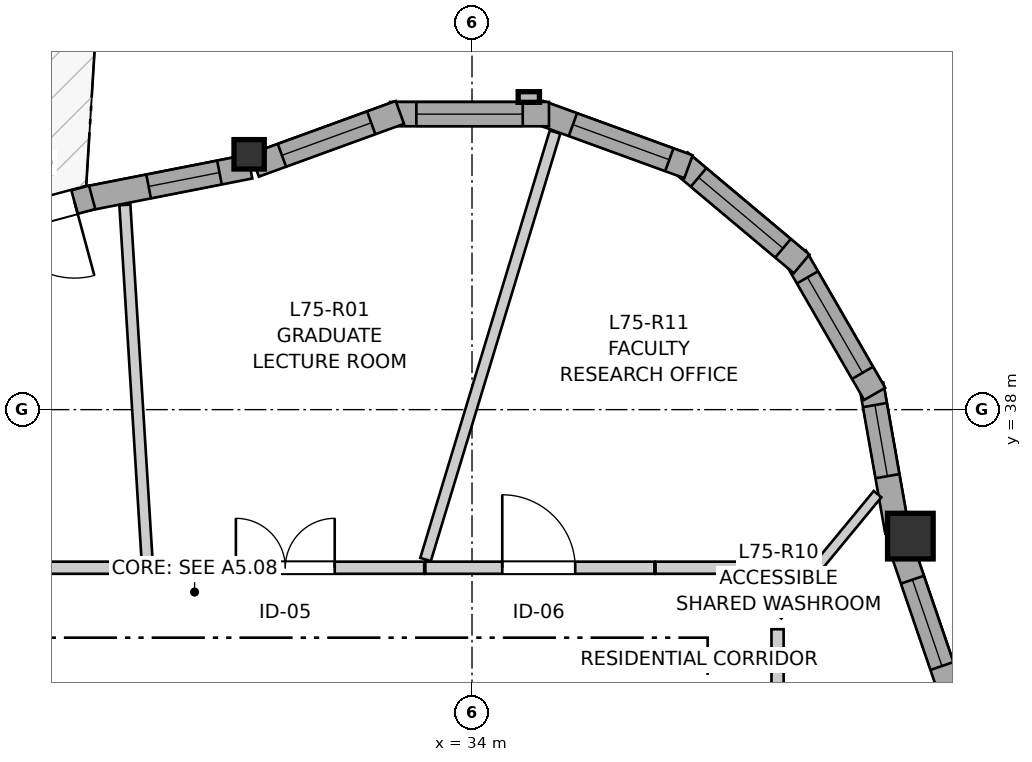
"""IFC4 building model, lengths in metres.
Left out: names, types, materials, properties, quantities, classifications, styles, units other than length and angle.
Written with IfcOpenShell. Run it as: python <this file> out.ifc"""

import sys

from ifc_helpers import new_model, si_unit, direction, frame, frame_2d, origin, origin_2d, place, context, subcontext, project, spatial, rectangle, i_section, extrude, source, transform, mapped, element, fill, save


model = new_model("IFC4")
c1 = context("Model", 3, precision=1e-05, world=origin(), true_north=direction((0.0, 1.0)))
c2 = subcontext(c1, "Body", "Model", "MODEL_VIEW")
j1 = project(units=[si_unit("LENGTHUNIT", "METRE"), si_unit("PLANEANGLEUNIT", "RADIAN")], contexts=[c1])
p1 = place(None, origin())
s1 = spatial("IfcSite", under=j1, at=p1, CompositionType="ELEMENT")
p2 = place(p1, origin())
s2 = spatial("IfcBuilding", under=s1, at=p2, CompositionType="ELEMENT")
p3 = place(p2, frame((0.0, 0.0, 250.0)))
s3 = spatial("IfcBuildingStorey", under=s2, at=p3, CompositionType="ELEMENT", Elevation=250.0)
m1 = source(origin(), c2, "Body", "SweptSolid", [
    extrude(rectangle(XDim=0.6, YDim=0.6, at=origin_2d()), origin(), (0.0, 0.0, 1.0), 2.95),
])
p4 = place(p3, frame((39.768, 36.336, 0.0), z_axis=(0.0, 0.0, 1.0), x_axis=(1.0, 0.0, 0.0)))
e1 = element("IfcColumn", 1, at=p4, inside=s3, PredefinedType="COLUMN", context=c2, shape_type="MappedRepresentation", body=[
    mapped(m1, transform((0.0, 0.0, 0.0), x_axis=(1.0, 0.0, 0.0), y_axis=(0.0, 1.0, 0.0), z_axis=(0.0, 0.0, 1.0), scale=1.0)),
])
m2 = source(origin(), c2, "Body", "SweptSolid", [
    extrude(i_section(OverallWidth=0.398, OverallDepth=0.387, WebThickness=0.019, FlangeThickness=0.03, FilletRadius=0.015, at=origin_2d()), origin(), (0.0, 0.0, 1.0), 2.95),
])
p5 = place(p3, frame((31.067, 41.359, 0.0), z_axis=(0.0, 0.0, 1.0), x_axis=(1.0, 0.0, 0.0)))
e2 = element("IfcColumn", 2, at=p5, inside=s3, PredefinedType="PILASTER", context=c2, shape_type="MappedRepresentation", body=[
    mapped(m2, transform((0.0, 0.0, 0.0), x_axis=(1.0, 0.0, 0.0), y_axis=(0.0, 1.0, 0.0), z_axis=(0.0, 0.0, 1.0), scale=1.0)),
])
p6 = place(p3, frame((40.335, 34.181, 0.0), z_axis=(0.0, 0.0, 1.0), x_axis=(-0.323601383087, 0.946193502865, 0.0)))
e3 = element("IfcWall", 3, at=p6, inside=s3, PredefinedType="SOLIDWALL", context=c2, shape_type="SweptSolid", body=[
    extrude(rectangle(XDim=2.133, YDim=0.32, at=frame_2d((1.066, 0.0))), origin(), (0.0, 0.0, 1.0), 2.57),
])
p7 = place(p6, frame((0.471, 0.0, 0.82)))
e4 = element("IfcOpeningElement", 4, at=p7, cuts=e3, PredefinedType="OPENING", context=c2, shape_type="SweptSolid", body=[
    extrude(rectangle(XDim=1.2, YDim=1.45, at=frame_2d((0.6, 0.725))), frame((0.0, 0.17, 0.0), z_axis=(0.0, -1.0, 0.0), x_axis=(1.0, 0.0, 0.0)), (0.0, 0.0, 1.0), 0.34),
])
p8 = place(p3, frame((39.594, 36.397, 0.0), z_axis=(0.0, 0.0, 1.0), x_axis=(-0.173671780312, 0.984803590937, 0.0)))
e5 = element("IfcWall", 5, at=p8, inside=s3, PredefinedType="SOLIDWALL", context=c2, shape_type="SweptSolid", body=[
    extrude(rectangle(XDim=1.962, YDim=0.32, at=frame_2d((0.981, 0.0))), origin(), (0.0, 0.0, 1.0), 2.57),
])
p9 = place(p8, frame((0.739, 0.0, 0.82)))
e6 = element("IfcOpeningElement", 6, at=p9, cuts=e5, PredefinedType="OPENING", context=c2, shape_type="SweptSolid", body=[
    extrude(rectangle(XDim=0.95, YDim=1.35, at=frame_2d((0.475, 0.675))), frame((0.0, 0.17, 0.0), z_axis=(0.0, -1.0, 0.0), x_axis=(1.0, 0.0, 0.0)), (0.0, 0.0, 1.0), 0.34),
])
p10 = place(p3, frame((39.298, 38.207, 0.0), z_axis=(0.0, 0.0, 1.0), x_axis=(-0.499995423472, 0.866028046028, 0.0)))
e7 = element("IfcWall", 7, at=p10, inside=s3, PredefinedType="SOLIDWALL", context=c2, shape_type="SweptSolid", body=[
    extrude(rectangle(XDim=2.09, YDim=0.32, at=frame_2d((1.045, 0.0))), origin(), (0.0, 0.0, 1.0), 2.57),
])
p11 = place(p10, frame((0.32, 0.0, 0.82)))
e8 = element("IfcOpeningElement", 8, at=p11, cuts=e7, PredefinedType="OPENING", context=c2, shape_type="SweptSolid", body=[
    extrude(rectangle(XDim=1.45, YDim=1.25, at=frame_2d((0.725, 0.625))), frame((0.0, 0.17, 0.0), z_axis=(0.0, -1.0, 0.0), x_axis=(1.0, 0.0, 0.0)), (0.0, 0.0, 1.0), 0.34),
])
p12 = place(p3, frame((38.337, 39.917, 0.0), z_axis=(0.0, 0.0, 1.0), x_axis=(-0.766024572719, 0.642811289563, 0.0)))
e9 = element("IfcWall", 9, at=p12, inside=s3, PredefinedType="SOLIDWALL", context=c2, shape_type="SweptSolid", body=[
    extrude(rectangle(XDim=2.09, YDim=0.32, at=frame_2d((1.045, 0.0))), origin(), (0.0, 0.0, 1.0), 2.57),
])
p13 = place(p12, frame((0.32, 0.0, 0.82)))
e10 = element("IfcOpeningElement", 10, at=p13, cuts=e9, PredefinedType="OPENING", context=c2, shape_type="SweptSolid", body=[
    extrude(rectangle(XDim=1.45, YDim=1.25, at=frame_2d((0.725, 0.625))), frame((0.0, 0.17, 0.0), z_axis=(0.0, -1.0, 0.0), x_axis=(1.0, 0.0, 0.0)), (0.0, 0.0, 1.0), 0.34),
])
p14 = place(p3, frame((36.848, 41.196, 0.0), z_axis=(0.0, 0.0, 1.0), x_axis=(-0.93973543134, 0.341902499383, 0.0)))
e11 = element("IfcWall", 11, at=p14, inside=s3, PredefinedType="SOLIDWALL", context=c2, shape_type="SweptSolid", body=[
    extrude(rectangle(XDim=2.09, YDim=0.32, at=frame_2d((1.045, 0.0))), origin(), (0.0, 0.0, 1.0), 2.57),
])
p15 = place(p14, frame((0.269, 0.0, 0.82)))
e12 = element("IfcOpeningElement", 12, at=p15, cuts=e11, PredefinedType="OPENING", context=c2, shape_type="SweptSolid", body=[
    extrude(rectangle(XDim=1.35, YDim=1.45, at=frame_2d((0.675, 0.725))), frame((0.0, 0.17, 0.0), z_axis=(0.0, -1.0, 0.0), x_axis=(1.0, 0.0, 0.0)), (0.0, 0.0, 1.0), 0.34),
])
p16 = place(p3, frame((35.013, 41.888, 0.0), z_axis=(0.0, 0.0, 1.0), x_axis=(-1.0, 0.0, 0.0)))
e13 = element("IfcWall", 13, at=p16, inside=s3, PredefinedType="SOLIDWALL", context=c2, shape_type="SweptSolid", body=[
    extrude(rectangle(XDim=2.09, YDim=0.32, at=frame_2d((1.045, 0.0))), origin(), (0.0, 0.0, 1.0), 2.57),
])
p17 = place(p16, frame((0.345, 0.0, 0.82)))
e14 = element("IfcOpeningElement", 14, at=p17, cuts=e13, PredefinedType="OPENING", context=c2, shape_type="SweptSolid", body=[
    extrude(rectangle(XDim=1.4, YDim=1.35, at=frame_2d((0.7, 0.675))), frame((0.0, 0.17, 0.0), z_axis=(0.0, -1.0, 0.0), x_axis=(1.0, 0.0, 0.0)), (0.0, 0.0, 1.0), 0.34),
])
p18 = place(p3, frame((33.051, 41.91, 0.0), z_axis=(0.0, 0.0, 1.0), x_axis=(-0.939730268502, -0.341916689358, 0.0)))
e15 = element("IfcWall", 15, at=p18, inside=s3, PredefinedType="SOLIDWALL", context=c2, shape_type="SweptSolid", body=[
    extrude(rectangle(XDim=2.032, YDim=0.32, at=frame_2d((1.016, 0.0))), origin(), (0.0, 0.0, 1.0), 2.57),
])
p19 = place(p18, frame((0.401, 0.0, 0.82)))
e16 = element("IfcOpeningElement", 16, at=p19, cuts=e15, PredefinedType="OPENING", context=c2, shape_type="SweptSolid", body=[
    extrude(rectangle(XDim=1.25, YDim=1.35, at=frame_2d((0.625, 0.675))), frame((0.0, 0.17, 0.0), z_axis=(0.0, -1.0, 0.0), x_axis=(1.0, 0.0, 0.0)), (0.0, 0.0, 1.0), 0.34),
])
p20 = place(p3, frame((31.079, 41.198, 0.0), z_axis=(0.0, 0.0, 1.0), x_axis=(-0.981223354781, -0.192874902544, 0.0)))
e17 = element("IfcWall", 17, at=p20, inside=s3, PredefinedType="SOLIDWALL", context=c2, shape_type="SweptSolid", body=[
    extrude(rectangle(XDim=2.202, YDim=0.32, at=frame_2d((1.101, 0.0))), origin(), (0.0, 0.0, 1.0), 2.57),
])
p21 = place(p20, frame((0.409, 0.0, 0.82)))
e18 = element("IfcOpeningElement", 18, at=p21, cuts=e17, PredefinedType="OPENING", context=c2, shape_type="SweptSolid", body=[
    extrude(rectangle(XDim=0.95, YDim=1.35, at=frame_2d((0.475, 0.675))), frame((0.0, 0.17, 0.0), z_axis=(0.0, -1.0, 0.0), x_axis=(1.0, 0.0, 0.0)), (0.0, 0.0, 1.0), 0.34),
])
p22 = place(p3, frame((29.002, 40.793, 0.0), z_axis=(0.0, 0.0, 1.0), x_axis=(-0.965467637734, -0.260523013357, 0.0)))
e19 = element("IfcWall", 19, at=p22, inside=s3, PredefinedType="SOLIDWALL", context=c2, shape_type="SweptSolid", body=[
    extrude(rectangle(XDim=2.087, YDim=0.32, at=frame_2d((1.043, 0.0))), origin(), (0.0, 0.0, 1.0), 2.57),
])
p23 = place(p22, frame((0.24, 0.0, 0.0)))
e20 = element("IfcOpeningElement", 20, at=p23, cuts=e19, PredefinedType="OPENING", context=c2, shape_type="SweptSolid", body=[
    extrude(rectangle(XDim=1.0, YDim=2.1, at=frame_2d((0.5, 1.05))), frame((0.0, 0.17, 0.0), z_axis=(0.0, -1.0, 0.0), x_axis=(1.0, 0.0, 0.0)), (0.0, 0.0, 1.0), 0.34),
])
p24 = place(p3, frame((24.3, 35.92, 0.0), z_axis=(0.0, 0.0, 1.0), x_axis=(1.0, 0.0, 0.0)))
e21 = element("IfcWall", 21, at=p24, inside=s3, PredefinedType="PARTITIONING", context=c2, shape_type="SweptSolid", body=[
    extrude(rectangle(XDim=5.446, YDim=0.16, at=frame_2d((2.723, 0.0))), origin(), (0.0, 0.0, 1.0), 2.95),
])
p25 = place(p24, frame((2.236, 0.0, 0.0)))
e22 = element("IfcOpeningElement", 22, at=p25, cuts=e21, PredefinedType="OPENING", context=c2, shape_type="SweptSolid", body=[
    extrude(rectangle(XDim=0.96, YDim=2.1, at=frame_2d((0.48, 1.05))), frame((0.0, 0.09, 0.0), z_axis=(0.0, -1.0, 0.0), x_axis=(1.0, 0.0, 0.0)), (0.0, 0.0, 1.0), 0.18),
])
p26 = place(p3, frame((29.761, 35.92, 0.0), z_axis=(0.0, 0.0, 1.0), x_axis=(1.0, 0.0, 0.0)))
e23 = element("IfcWall", 23, at=p26, inside=s3, PredefinedType="PARTITIONING", context=c2, shape_type="SweptSolid", body=[
    extrude(rectangle(XDim=3.61, YDim=0.16, at=frame_2d((1.805, 0.0))), origin(), (0.0, 0.0, 1.0), 2.95),
])
p27 = place(p26, frame((1.133, 0.0, 0.0)))
e24 = element("IfcOpeningElement", 24, at=p27, cuts=e23, PredefinedType="OPENING", context=c2, shape_type="SweptSolid", body=[
    extrude(rectangle(XDim=1.3, YDim=2.1, at=frame_2d((0.65, 1.05))), frame((0.0, 0.09, 0.0), z_axis=(0.0, -1.0, 0.0), x_axis=(1.0, 0.0, 0.0)), (0.0, 0.0, 1.0), 0.18),
])
p28 = place(p3, frame((33.386, 35.92, 0.0), z_axis=(0.0, 0.0, 1.0), x_axis=(1.0, 0.0, 0.0)))
e25 = element("IfcWall", 25, at=p28, inside=s3, PredefinedType="PARTITIONING", context=c2, shape_type="SweptSolid", body=[
    extrude(rectangle(XDim=3.014, YDim=0.16, at=frame_2d((1.507, 0.0))), origin(), (0.0, 0.0, 1.0), 2.588),
])
p29 = place(p28, frame((1.012, 0.0, 0.0)))
e26 = element("IfcOpeningElement", 26, at=p29, cuts=e25, PredefinedType="OPENING", context=c2, shape_type="SweptSolid", body=[
    extrude(rectangle(XDim=0.96, YDim=2.1, at=frame_2d((0.48, 1.05))), frame((0.0, 0.09, 0.0), z_axis=(0.0, -1.0, 0.0), x_axis=(1.0, 0.0, 0.0)), (0.0, 0.0, 1.0), 0.18),
])
p30 = place(p3, frame((33.389, 36.029, 0.0), z_axis=(0.0, 0.0, 1.0), x_axis=(0.289965875663, 0.957036985153, 0.0)))
e27 = element("IfcWall", 27, at=p30, inside=s3, PredefinedType="PARTITIONING", context=c2, shape_type="SweptSolid", body=[
    extrude(rectangle(XDim=5.875, YDim=0.145, at=frame_2d((2.938, 0.0))), origin(), (0.0, 0.0, 1.0), 2.95),
])
p31 = place(p3, frame((29.433, 40.694, 0.0), z_axis=(0.0, 0.0, 1.0), x_axis=(0.062358842424, -0.998053793526, 0.0)))
e28 = element("IfcWall", 28, at=p31, inside=s3, PredefinedType="PARTITIONING", context=c2, shape_type="SweptSolid", body=[
    extrude(rectangle(XDim=4.69, YDim=0.145, at=frame_2d((2.345, 0.0))), origin(), (0.0, 0.0, 1.0), 2.95),
])
p32 = place(p3, frame((38.02, 35.294, 0.0), z_axis=(0.0, 0.0, 1.0), x_axis=(0.636518208935, 0.771261673943, 0.0)))
e29 = element("IfcWall", 29, at=p32, inside=s3, PredefinedType="PARTITIONING", context=c2, shape_type="SweptSolid", body=[
    extrude(rectangle(XDim=2.067, YDim=0.13, at=frame_2d((1.034, 0.0))), origin(), (0.0, 0.0, 1.0), 2.95),
])
p33 = place(p3, frame((36.415, 35.92, 0.0), z_axis=(0.0, 0.0, 1.0), x_axis=(1.0, 0.0, 0.0)))
e30 = element("IfcWall", 30, at=p33, inside=s3, PredefinedType="PARTITIONING", context=c2, shape_type="SweptSolid", body=[
    extrude(rectangle(XDim=1.605, YDim=0.16, at=frame_2d((0.802, 0.0))), origin(), (0.0, 0.0, 1.0), 2.588),
])
p34 = place(p3, frame((38.02, 34.315, 0.0), z_axis=(0.0, 0.0, 1.0), x_axis=(0.0, 1.0, 0.0)))
e31 = element("IfcWall", 31, at=p34, inside=s3, PredefinedType="PARTITIONING", context=c2, shape_type="SweptSolid", body=[
    extrude(rectangle(XDim=0.796, YDim=0.16, at=frame_2d((0.398, 0.0))), origin(), (0.0, 0.0, 1.0), 2.95),
])
p35 = place(p3, frame((38.02, 35.423, 0.0), z_axis=(0.0, 0.0, 1.0), x_axis=(0.0, 1.0, 0.0)))
e32 = element("IfcWall", 32, at=p35, inside=s3, PredefinedType="PARTITIONING", context=c2, shape_type="SweptSolid", body=[
    extrude(rectangle(XDim=0.497, YDim=0.16, at=frame_2d((0.249, 0.0))), origin(), (0.0, 0.0, 1.0), 2.95),
])
m3 = source(origin(), c2, "Body", "SweptSolid", [
    extrude(rectangle(XDim=1.2, YDim=1.45, at=frame_2d((0.6, 0.725))), frame((0.0, 0.03, 0.0), z_axis=(0.0, -1.0, 0.0), x_axis=(1.0, 0.0, 0.0)), (0.0, 0.0, 1.0), 0.06),
])
p36 = place(p7, origin())
e33 = element("IfcWindow", 33, at=p36, inside=s3, PartitioningType="SINGLE_PANEL", PredefinedType="WINDOW", context=c2, shape_type="MappedRepresentation", body=[
    mapped(m3, transform((0.0, 0.0, 0.0), x_axis=(1.0, 0.0, 0.0), y_axis=(0.0, 1.0, 0.0), z_axis=(0.0, 0.0, 1.0), scale=1.0)),
])
fill(e4, e33)
m4 = source(origin(), c2, "Body", "SweptSolid", [
    extrude(rectangle(XDim=0.95, YDim=1.35, at=frame_2d((0.475, 0.675))), frame((0.0, 0.03, 0.0), z_axis=(0.0, -1.0, 0.0), x_axis=(1.0, 0.0, 0.0)), (0.0, 0.0, 1.0), 0.06),
])
p37 = place(p9, origin())
e34 = element("IfcWindow", 34, at=p37, inside=s3, PartitioningType="SINGLE_PANEL", PredefinedType="WINDOW", context=c2, shape_type="MappedRepresentation", body=[
    mapped(m4, transform((0.0, 0.0, 0.0), x_axis=(1.0, 0.0, 0.0), y_axis=(0.0, 1.0, 0.0), z_axis=(0.0, 0.0, 1.0), scale=1.0)),
])
fill(e6, e34)
m5 = source(origin(), c2, "Body", "SweptSolid", [
    extrude(rectangle(XDim=1.45, YDim=1.25, at=frame_2d((0.725, 0.625))), frame((0.0, 0.03, 0.0), z_axis=(0.0, -1.0, 0.0), x_axis=(1.0, 0.0, 0.0)), (0.0, 0.0, 1.0), 0.06),
])
p38 = place(p11, origin())
e35 = element("IfcWindow", 35, at=p38, inside=s3, PartitioningType="SINGLE_PANEL", PredefinedType="WINDOW", context=c2, shape_type="MappedRepresentation", body=[
    mapped(m5, transform((0.0, 0.0, 0.0), x_axis=(1.0, 0.0, 0.0), y_axis=(0.0, 1.0, 0.0), z_axis=(0.0, 0.0, 1.0), scale=1.0)),
])
fill(e8, e35)
p39 = place(p13, origin())
e36 = element("IfcWindow", 36, at=p39, inside=s3, PartitioningType="SINGLE_PANEL", PredefinedType="WINDOW", context=c2, shape_type="MappedRepresentation", body=[
    mapped(m5, transform((0.0, 0.0, 0.0), x_axis=(1.0, 0.0, 0.0), y_axis=(0.0, 1.0, 0.0), z_axis=(0.0, 0.0, 1.0), scale=1.0)),
])
fill(e10, e36)
m6 = source(origin(), c2, "Body", "SweptSolid", [
    extrude(rectangle(XDim=1.35, YDim=1.45, at=frame_2d((0.675, 0.725))), frame((0.0, 0.03, 0.0), z_axis=(0.0, -1.0, 0.0), x_axis=(1.0, 0.0, 0.0)), (0.0, 0.0, 1.0), 0.06),
])
p40 = place(p15, origin())
e37 = element("IfcWindow", 37, at=p40, inside=s3, PartitioningType="SINGLE_PANEL", PredefinedType="WINDOW", context=c2, shape_type="MappedRepresentation", body=[
    mapped(m6, transform((0.0, 0.0, 0.0), x_axis=(1.0, 0.0, 0.0), y_axis=(0.0, 1.0, 0.0), z_axis=(0.0, 0.0, 1.0), scale=1.0)),
])
fill(e12, e37)
m7 = source(origin(), c2, "Body", "SweptSolid", [
    extrude(rectangle(XDim=1.4, YDim=1.35, at=frame_2d((0.7, 0.675))), frame((0.0, 0.03, 0.0), z_axis=(0.0, -1.0, 0.0), x_axis=(1.0, 0.0, 0.0)), (0.0, 0.0, 1.0), 0.06),
])
p41 = place(p17, origin())
e38 = element("IfcWindow", 38, at=p41, inside=s3, PartitioningType="SINGLE_PANEL", PredefinedType="WINDOW", context=c2, shape_type="MappedRepresentation", body=[
    mapped(m7, transform((0.0, 0.0, 0.0), x_axis=(1.0, 0.0, 0.0), y_axis=(0.0, 1.0, 0.0), z_axis=(0.0, 0.0, 1.0), scale=1.0)),
])
fill(e14, e38)
m8 = source(origin(), c2, "Body", "SweptSolid", [
    extrude(rectangle(XDim=1.25, YDim=1.35, at=frame_2d((0.625, 0.675))), frame((0.0, 0.03, 0.0), z_axis=(0.0, -1.0, 0.0), x_axis=(1.0, 0.0, 0.0)), (0.0, 0.0, 1.0), 0.06),
])
p42 = place(p19, origin())
e39 = element("IfcWindow", 39, at=p42, inside=s3, PartitioningType="SINGLE_PANEL", PredefinedType="WINDOW", context=c2, shape_type="MappedRepresentation", body=[
    mapped(m8, transform((0.0, 0.0, 0.0), x_axis=(1.0, 0.0, 0.0), y_axis=(0.0, 1.0, 0.0), z_axis=(0.0, 0.0, 1.0), scale=1.0)),
])
fill(e16, e39)
p43 = place(p21, origin())
e40 = element("IfcWindow", 40, at=p43, inside=s3, PartitioningType="SINGLE_PANEL", PredefinedType="WINDOW", context=c2, shape_type="MappedRepresentation", body=[
    mapped(m4, transform((0.0, 0.0, 0.0), x_axis=(1.0, 0.0, 0.0), y_axis=(0.0, 1.0, 0.0), z_axis=(0.0, 0.0, 1.0), scale=1.0)),
])
fill(e18, e40)
m9 = source(origin(), c2, "Body", "SweptSolid", [
    extrude(rectangle(XDim=1.0, YDim=2.1, at=frame_2d((0.5, 1.05))), frame((0.0, 0.025, 0.0), z_axis=(0.0, -1.0, 0.0), x_axis=(1.0, 0.0, 0.0)), (0.0, 0.0, 1.0), 0.05),
])
p44 = place(p23, origin())
e41 = element("IfcDoor", 41, at=p44, inside=s3, OperationType="SINGLE_SWING_LEFT", PredefinedType="DOOR", context=c2, shape_type="MappedRepresentation", body=[
    mapped(m9, transform((0.0, 0.0, 0.0), x_axis=(1.0, 0.0, 0.0), y_axis=(0.0, 1.0, 0.0), z_axis=(0.0, 0.0, 1.0), scale=1.0)),
])
fill(e20, e41)
m10 = source(origin(), c2, "Body", "SweptSolid", [
    extrude(rectangle(XDim=1.3, YDim=2.1, at=frame_2d((0.65, 1.05))), frame((0.0, 0.025, 0.0), z_axis=(0.0, -1.0, 0.0), x_axis=(1.0, 0.0, 0.0)), (0.0, 0.0, 1.0), 0.05),
])
p45 = place(p27, origin())
e42 = element("IfcDoor", 42, at=p45, inside=s3, OperationType="DOUBLE_DOOR_SINGLE_SWING", PredefinedType="DOOR", context=c2, shape_type="MappedRepresentation", body=[
    mapped(m10, transform((0.0, 0.0, 0.0), x_axis=(1.0, 0.0, 0.0), y_axis=(0.0, 1.0, 0.0), z_axis=(0.0, 0.0, 1.0), scale=1.0)),
])
fill(e24, e42)
m11 = source(origin(), c2, "Body", "SweptSolid", [
    extrude(rectangle(XDim=0.96, YDim=2.1, at=frame_2d((0.48, 1.05))), frame((0.0, 0.025, 0.0), z_axis=(0.0, -1.0, 0.0), x_axis=(1.0, 0.0, 0.0)), (0.0, 0.0, 1.0), 0.05),
])
p46 = place(p29, origin())
e43 = element("IfcDoor", 43, at=p46, inside=s3, OperationType="SINGLE_SWING_LEFT", PredefinedType="DOOR", context=c2, shape_type="MappedRepresentation", body=[
    mapped(m11, transform((0.0, 0.0, 0.0), x_axis=(1.0, 0.0, 0.0), y_axis=(0.0, 1.0, 0.0), z_axis=(0.0, 0.0, 1.0), scale=1.0)),
])
fill(e26, e43)
save(model, sys.argv[1])
